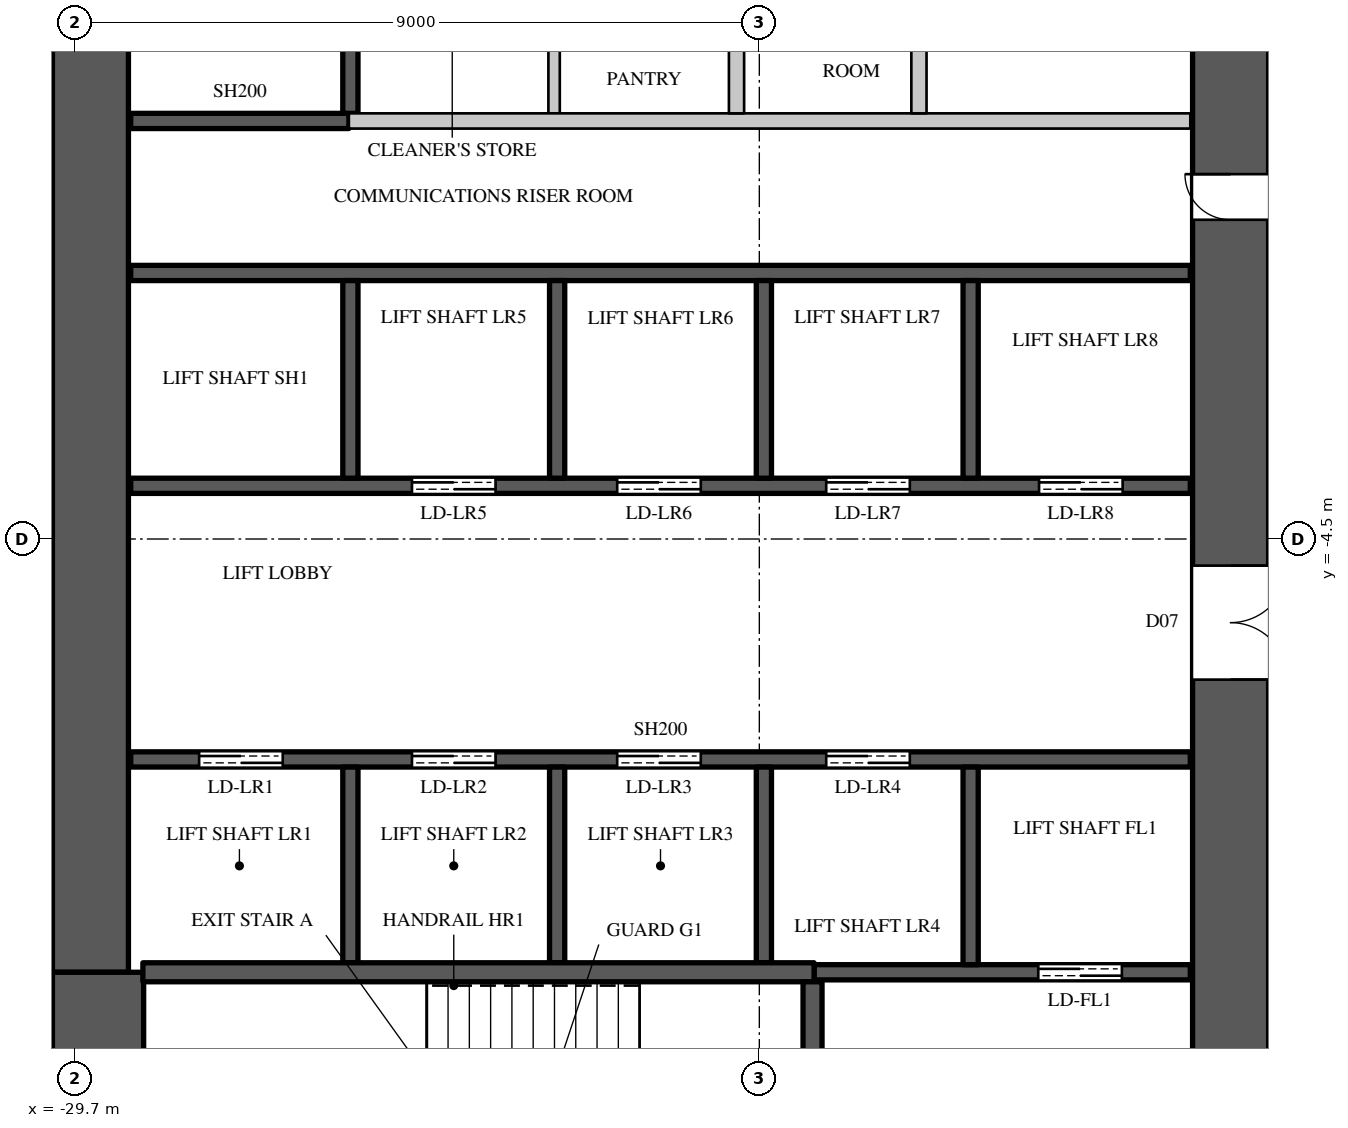
"""IFC4 building model, lengths in metres.
Left out: names, types, materials, properties, quantities, classifications, styles, units other than length and angle.
Written with IfcOpenShell. Run it as: python <this file> out.ifc"""

import sys

from ifc_helpers import new_model, si_unit, direction, frame, frame_2d, origin, place, context, subcontext, project, spatial, rectangle, extrude, element, fill, save


model = new_model("IFC4")
c1 = context("Model", 3, precision=1e-05, world=origin(), true_north=direction((0.0, 1.0)))
c2 = subcontext(c1, "Body", "Model", "MODEL_VIEW")
j1 = project(units=[si_unit("LENGTHUNIT", "METRE"), si_unit("PLANEANGLEUNIT", "RADIAN")], contexts=[c1])
p1 = place(None, origin())
s1 = spatial("IfcSite", under=j1, at=p1, CompositionType="ELEMENT")
p2 = place(p1, origin())
s2 = spatial("IfcBuilding", under=s1, at=p2, CompositionType="ELEMENT")
p3 = place(p2, frame((0.0, 0.0, 84.3)))
s3 = spatial("IfcBuildingStorey", under=s2, at=p3, CompositionType="ELEMENT", Elevation=84.3)
p4 = place(p3, frame((-14.5, -14.8, 0.0), z_axis=(0.0, 0.0, 1.0), x_axis=(0.0, 1.0, 0.0)))
e1 = element("IfcWall", 1, at=p4, inside=s3, PredefinedType="SHEAR", context=c2, shape_type="SweptSolid", body=[
    extrude(rectangle(XDim=29.6, YDim=1.0, at=frame_2d((14.8, 0.0))), origin(), (0.0, 0.0, 1.0), 3.6),
])
p5 = place(p4, frame((8.45, 0.0, 0.0)))
e2 = element("IfcOpeningElement", 2, at=p5, cuts=e1, PredefinedType="OPENING", context=c2, shape_type="SweptSolid", body=[
    extrude(rectangle(XDim=1.5, YDim=2.4, at=frame_2d((0.75, 1.2))), frame((0.0, 0.51, 0.0), z_axis=(0.0, -1.0, 0.0), x_axis=(1.0, 0.0, 0.0)), (0.0, 0.0, 1.0), 1.02),
])
p6 = place(p4, frame((19.65, 0.0, 0.0)))
e3 = element("IfcOpeningElement", 3, at=p6, cuts=e1, PredefinedType="OPENING", context=c2, shape_type="SweptSolid", body=[
    extrude(rectangle(XDim=1.5, YDim=2.4, at=frame_2d((0.75, 1.2))), frame((0.0, 0.51, 0.0), z_axis=(0.0, -1.0, 0.0), x_axis=(1.0, 0.0, 0.0)), (0.0, 0.0, 1.0), 1.02),
])
p7 = place(p4, frame((14.5, 0.0, 0.0)))
e4 = element("IfcOpeningElement", 4, at=p7, cuts=e1, PredefinedType="OPENING", context=c2, shape_type="SweptSolid", body=[
    extrude(rectangle(XDim=0.6, YDim=2.0, at=frame_2d((0.3, 1.0))), frame((0.0, 0.51, 0.0), z_axis=(0.0, -1.0, 0.0), x_axis=(1.0, 0.0, 0.0)), (0.0, 0.0, 1.0), 1.02),
])
p8 = place(p3, frame((-29.5, -10.2, 0.0), z_axis=(0.0, 0.0, 1.0), x_axis=(0.0, 1.0, 0.0)))
e5 = element("IfcWall", 5, at=p8, inside=s3, PredefinedType="SHEAR", context=c2, shape_type="SweptSolid", body=[
    extrude(rectangle(XDim=20.4, YDim=1.0, at=frame_2d((10.2, 0.0))), origin(), (0.0, 0.0, 1.0), 3.6),
])
p9 = place(p3, frame((-29.4, -14.8, 0.0), z_axis=(0.0, 0.0, 1.0), x_axis=(0.0, 1.0, 0.0)))
e6 = element("IfcWall", 6, at=p9, inside=s3, PredefinedType="SHEAR", context=c2, shape_type="SweptSolid", body=[
    extrude(rectangle(XDim=4.6, YDim=1.2, at=frame_2d((2.3, 0.0))), origin(), (0.0, 0.0, 1.0), 3.6),
])
p10 = place(p3, frame((-23.4, 1.1, 0.0), z_axis=(0.0, 0.0, 1.0), x_axis=(0.0, 1.0, 0.0)))
e7 = element("IfcWall", 7, at=p10, inside=s3, PredefinedType="PARTITIONING", context=c2, shape_type="SweptSolid", body=[
    extrude(rectangle(XDim=2.6, YDim=0.15, at=frame_2d((1.3, 0.0))), origin(), (0.0, 0.0, 1.0), 3.3),
])
p11 = place(p3, frame((-26.1, 1.0, 0.0), z_axis=(0.0, 0.0, 1.0), x_axis=(1.0, 0.0, 0.0)))
e8 = element("IfcWall", 8, at=p11, inside=s3, PredefinedType="PARTITIONING", context=c2, shape_type="SweptSolid", body=[
    extrude(rectangle(XDim=11.07, YDim=0.2, at=frame_2d((5.535, 0.0))), origin(), (0.0, 0.0, 1.0), 3.3),
])
for number, where, z_axis, x_axis in (
    (9, (-21.0, 1.1, 0.0), (0.0, 0.0, 1.0), (0.0, 1.0, 0.0)),
    (10, (-18.6, 1.1, 0.0), (0.0, 0.0, 1.0), (0.0, 1.0, 0.0)),
):
    element("IfcWall", number, at=place(p3, frame(where, z_axis=z_axis, x_axis=x_axis)), inside=s3, PredefinedType="PARTITIONING", context=c2, shape_type="SweptSolid", body=[
        extrude(rectangle(XDim=2.6, YDim=0.2, at=frame_2d((1.3, 0.0))), origin(), (0.0, 0.0, 1.0), 3.3),
    ])
p12 = place(p3, frame((-28.97, -7.4, 0.0), z_axis=(0.0, 0.0, 1.0), x_axis=(1.0, 0.0, 0.0)))
e11 = element("IfcWall", 11, at=p12, inside=s3, PredefinedType="SHEAR", context=c2, shape_type="SweptSolid", body=[
    extrude(rectangle(XDim=13.94, YDim=0.2, at=frame_2d((6.97, 0.0))), origin(), (0.0, 0.0, 1.0), 3.3),
])
p13 = place(p12, frame((0.9, 0.0, 0.0)))
e12 = element("IfcOpeningElement", 12, at=p13, cuts=e11, PredefinedType="OPENING", context=c2, shape_type="SweptSolid", body=[
    extrude(rectangle(XDim=1.1, YDim=2.2, at=frame_2d((0.55, 1.1))), frame((0.0, 0.11, 0.0), z_axis=(0.0, -1.0, 0.0), x_axis=(1.0, 0.0, 0.0)), (0.0, 0.0, 1.0), 0.22),
])
p14 = place(p12, frame((3.7, 0.0, 0.0)))
e13 = element("IfcOpeningElement", 13, at=p14, cuts=e11, PredefinedType="OPENING", context=c2, shape_type="SweptSolid", body=[
    extrude(rectangle(XDim=1.1, YDim=2.2, at=frame_2d((0.55, 1.1))), frame((0.0, 0.11, 0.0), z_axis=(0.0, -1.0, 0.0), x_axis=(1.0, 0.0, 0.0)), (0.0, 0.0, 1.0), 0.22),
])
p15 = place(p12, frame((6.4, 0.0, 0.0)))
e14 = element("IfcOpeningElement", 14, at=p15, cuts=e11, PredefinedType="OPENING", context=c2, shape_type="SweptSolid", body=[
    extrude(rectangle(XDim=1.1, YDim=2.2, at=frame_2d((0.55, 1.1))), frame((0.0, 0.11, 0.0), z_axis=(0.0, -1.0, 0.0), x_axis=(1.0, 0.0, 0.0)), (0.0, 0.0, 1.0), 0.22),
])
p16 = place(p12, frame((9.15, 0.0, 0.0)))
e15 = element("IfcOpeningElement", 15, at=p16, cuts=e11, PredefinedType="OPENING", context=c2, shape_type="SweptSolid", body=[
    extrude(rectangle(XDim=1.1, YDim=2.2, at=frame_2d((0.55, 1.1))), frame((0.0, 0.11, 0.0), z_axis=(0.0, -1.0, 0.0), x_axis=(1.0, 0.0, 0.0)), (0.0, 0.0, 1.0), 0.22),
])
p17 = place(p3, frame((-28.97, -3.8, 0.0), z_axis=(0.0, 0.0, 1.0), x_axis=(1.0, 0.0, 0.0)))
e16 = element("IfcWall", 16, at=p17, inside=s3, PredefinedType="SHEAR", context=c2, shape_type="SweptSolid", body=[
    extrude(rectangle(XDim=13.94, YDim=0.2, at=frame_2d((6.97, 0.0))), origin(), (0.0, 0.0, 1.0), 3.3),
])
p18 = place(p17, frame((3.7, 0.0, 0.0)))
e17 = element("IfcOpeningElement", 17, at=p18, cuts=e16, PredefinedType="OPENING", context=c2, shape_type="SweptSolid", body=[
    extrude(rectangle(XDim=1.1, YDim=2.2, at=frame_2d((0.55, 1.1))), frame((0.0, 0.11, 0.0), z_axis=(0.0, -1.0, 0.0), x_axis=(1.0, 0.0, 0.0)), (0.0, 0.0, 1.0), 0.22),
])
p19 = place(p17, frame((6.4, 0.0, 0.0)))
e18 = element("IfcOpeningElement", 18, at=p19, cuts=e16, PredefinedType="OPENING", context=c2, shape_type="SweptSolid", body=[
    extrude(rectangle(XDim=1.1, YDim=2.2, at=frame_2d((0.55, 1.1))), frame((0.0, 0.11, 0.0), z_axis=(0.0, -1.0, 0.0), x_axis=(1.0, 0.0, 0.0)), (0.0, 0.0, 1.0), 0.22),
])
p20 = place(p17, frame((9.15, 0.0, 0.0)))
e19 = element("IfcOpeningElement", 19, at=p20, cuts=e16, PredefinedType="OPENING", context=c2, shape_type="SweptSolid", body=[
    extrude(rectangle(XDim=1.1, YDim=2.2, at=frame_2d((0.55, 1.1))), frame((0.0, 0.11, 0.0), z_axis=(0.0, -1.0, 0.0), x_axis=(1.0, 0.0, 0.0)), (0.0, 0.0, 1.0), 0.22),
])
p21 = place(p17, frame((11.95, 0.0, 0.0)))
e20 = element("IfcOpeningElement", 20, at=p21, cuts=e16, PredefinedType="OPENING", context=c2, shape_type="SweptSolid", body=[
    extrude(rectangle(XDim=1.1, YDim=2.2, at=frame_2d((0.55, 1.1))), frame((0.0, 0.11, 0.0), z_axis=(0.0, -1.0, 0.0), x_axis=(1.0, 0.0, 0.0)), (0.0, 0.0, 1.0), 0.22),
])
p22 = place(p3, frame((-28.97, -1.0, 0.0), z_axis=(0.0, 0.0, 1.0), x_axis=(1.0, 0.0, 0.0)))
e21 = element("IfcWall", 21, at=p22, inside=s3, PredefinedType="SHEAR", context=c2, shape_type="SweptSolid", body=[
    extrude(rectangle(XDim=13.94, YDim=0.2, at=frame_2d((6.97, 0.0))), origin(), (0.0, 0.0, 1.0), 3.3),
])
p23 = place(p3, frame((-28.97, 1.0, 0.0), z_axis=(0.0, 0.0, 1.0), x_axis=(1.0, 0.0, 0.0)))
e22 = element("IfcWall", 22, at=p23, inside=s3, PredefinedType="SHEAR", context=c2, shape_type="SweptSolid", body=[
    extrude(rectangle(XDim=2.87, YDim=0.2, at=frame_2d((1.435, 0.0))), origin(), (0.0, 0.0, 1.0), 3.3),
])
p24 = place(p3, frame((-26.08, -10.075, 0.0), z_axis=(0.0, 0.0, 1.0), x_axis=(0.0, 1.0, 0.0)))
e23 = element("IfcWall", 23, at=p24, inside=s3, PredefinedType="SHEAR", context=c2, shape_type="SweptSolid", body=[
    extrude(rectangle(XDim=2.575, YDim=0.2, at=frame_2d((1.288, 0.0))), origin(), (0.0, 0.0, 1.0), 3.6),
])
p25 = place(p3, frame((-26.08, -3.7, 0.0), z_axis=(0.0, 0.0, 1.0), x_axis=(0.0, 1.0, 0.0)))
e24 = element("IfcWall", 24, at=p25, inside=s3, PredefinedType="SHEAR", context=c2, shape_type="SweptSolid", body=[
    extrude(rectangle(XDim=2.6, YDim=0.2, at=frame_2d((1.3, 0.0))), origin(), (0.0, 0.0, 1.0), 3.6),
])
p26 = place(p3, frame((-26.08, 1.1, 0.0), z_axis=(0.0, 0.0, 1.0), x_axis=(0.0, 1.0, 0.0)))
e25 = element("IfcWall", 25, at=p26, inside=s3, PredefinedType="SHEAR", context=c2, shape_type="SweptSolid", body=[
    extrude(rectangle(XDim=2.6, YDim=0.2, at=frame_2d((1.3, 0.0))), origin(), (0.0, 0.0, 1.0), 3.3),
])
p27 = place(p3, frame((-23.36, -10.075, 0.0), z_axis=(0.0, 0.0, 1.0), x_axis=(0.0, 1.0, 0.0)))
e26 = element("IfcWall", 26, at=p27, inside=s3, PredefinedType="SHEAR", context=c2, shape_type="SweptSolid", body=[
    extrude(rectangle(XDim=2.575, YDim=0.2, at=frame_2d((1.288, 0.0))), origin(), (0.0, 0.0, 1.0), 3.6),
])
p28 = place(p3, frame((-23.36, -3.7, 0.0), z_axis=(0.0, 0.0, 1.0), x_axis=(0.0, 1.0, 0.0)))
e27 = element("IfcWall", 27, at=p28, inside=s3, PredefinedType="SHEAR", context=c2, shape_type="SweptSolid", body=[
    extrude(rectangle(XDim=2.6, YDim=0.2, at=frame_2d((1.3, 0.0))), origin(), (0.0, 0.0, 1.0), 3.6),
])
p29 = place(p3, frame((-20.64, -10.075, 0.0), z_axis=(0.0, 0.0, 1.0), x_axis=(0.0, 1.0, 0.0)))
e28 = element("IfcWall", 28, at=p29, inside=s3, PredefinedType="SHEAR", context=c2, shape_type="SweptSolid", body=[
    extrude(rectangle(XDim=2.575, YDim=0.2, at=frame_2d((1.288, 0.0))), origin(), (0.0, 0.0, 1.0), 3.6),
])
p30 = place(p3, frame((-20.64, -3.7, 0.0), z_axis=(0.0, 0.0, 1.0), x_axis=(0.0, 1.0, 0.0)))
e29 = element("IfcWall", 29, at=p30, inside=s3, PredefinedType="SHEAR", context=c2, shape_type="SweptSolid", body=[
    extrude(rectangle(XDim=2.6, YDim=0.2, at=frame_2d((1.3, 0.0))), origin(), (0.0, 0.0, 1.0), 3.6),
])
p31 = place(p3, frame((-19.98, -10.2, 0.0), z_axis=(0.0, 0.0, 1.0), x_axis=(1.0, 0.0, 0.0)))
e30 = element("IfcWall", 30, at=p31, inside=s3, PredefinedType="SHEAR", context=c2, shape_type="SweptSolid", body=[
    extrude(rectangle(XDim=4.95, YDim=0.2, at=frame_2d((2.475, 0.0))), origin(), (0.0, 0.0, 1.0), 3.3),
])
p32 = place(p31, frame((2.95, 0.0, 0.0)))
e31 = element("IfcOpeningElement", 31, at=p32, cuts=e30, PredefinedType="OPENING", context=c2, shape_type="SweptSolid", body=[
    extrude(rectangle(XDim=1.1, YDim=2.2, at=frame_2d((0.55, 1.1))), frame((0.0, 0.11, 0.0), z_axis=(0.0, -1.0, 0.0), x_axis=(1.0, 0.0, 0.0)), (0.0, 0.0, 1.0), 0.22),
])
p33 = place(p3, frame((-17.92, -10.1, 0.0), z_axis=(0.0, 0.0, 1.0), x_axis=(0.0, 1.0, 0.0)))
e32 = element("IfcWall", 32, at=p33, inside=s3, PredefinedType="SHEAR", context=c2, shape_type="SweptSolid", body=[
    extrude(rectangle(XDim=2.6, YDim=0.2, at=frame_2d((1.3, 0.0))), origin(), (0.0, 0.0, 1.0), 3.6),
])
p34 = place(p3, frame((-17.92, -3.7, 0.0), z_axis=(0.0, 0.0, 1.0), x_axis=(0.0, 1.0, 0.0)))
e33 = element("IfcWall", 33, at=p34, inside=s3, PredefinedType="SHEAR", context=c2, shape_type="SweptSolid", body=[
    extrude(rectangle(XDim=2.6, YDim=0.2, at=frame_2d((1.3, 0.0))), origin(), (0.0, 0.0, 1.0), 3.6),
])
p35 = place(p3, frame((-28.81, -10.2, 0.0), z_axis=(0.0, 0.0, 1.0), x_axis=(1.0, 0.0, 0.0)))
e34 = element("IfcWall", 34, at=p35, inside=s3, PredefinedType="SHEAR", context=c2, shape_type="SweptSolid", body=[
    extrude(rectangle(XDim=8.83, YDim=0.25, at=frame_2d((4.415, 0.0))), origin(), (0.0, 0.0, 1.0), 3.3),
])
p36 = place(p3, frame((-20.0, -14.77, 0.0), z_axis=(0.0, 0.0, 1.0), x_axis=(0.0, 1.0, 0.0)))
e35 = element("IfcWall", 35, at=p36, inside=s3, PredefinedType="SHEAR", context=c2, shape_type="SweptSolid", body=[
    extrude(rectangle(XDim=4.445, YDim=0.25, at=frame_2d((2.223, 0.0))), origin(), (0.0, 0.0, 1.0), 3.3),
])
p37 = place(p36, frame((1.7, 0.0, 0.0)))
e36 = element("IfcOpeningElement", 36, at=p37, cuts=e35, PredefinedType="OPENING", context=c2, shape_type="SweptSolid", body=[
    extrude(rectangle(XDim=1.1, YDim=2.2, at=frame_2d((0.55, 1.1))), frame((0.0, 0.135, 0.0), z_axis=(0.0, -1.0, 0.0), x_axis=(1.0, 0.0, 0.0)), (0.0, 0.0, 1.0), 0.27),
])
p38 = place(p13, origin())
e37 = element("IfcDoor", 37, at=p38, inside=s3, OperationType="DOUBLE_DOOR_SLIDING", PredefinedType="DOOR", context=c2, shape_type="SweptSolid", body=[
    extrude(rectangle(XDim=1.1, YDim=2.2, at=frame_2d((0.55, 1.1))), frame((0.0, 0.025, 0.0), z_axis=(0.0, -1.0, 0.0), x_axis=(1.0, 0.0, 0.0)), (0.0, 0.0, 1.0), 0.05),
])
fill(e12, e37)
p39 = place(p14, origin())
e38 = element("IfcDoor", 38, at=p39, inside=s3, OperationType="DOUBLE_DOOR_SLIDING", PredefinedType="DOOR", context=c2, shape_type="SweptSolid", body=[
    extrude(rectangle(XDim=1.1, YDim=2.2, at=frame_2d((0.55, 1.1))), frame((0.0, 0.025, 0.0), z_axis=(0.0, -1.0, 0.0), x_axis=(1.0, 0.0, 0.0)), (0.0, 0.0, 1.0), 0.05),
])
fill(e13, e38)
p40 = place(p15, origin())
e39 = element("IfcDoor", 39, at=p40, inside=s3, OperationType="DOUBLE_DOOR_SLIDING", PredefinedType="DOOR", context=c2, shape_type="SweptSolid", body=[
    extrude(rectangle(XDim=1.1, YDim=2.2, at=frame_2d((0.55, 1.1))), frame((0.0, 0.025, 0.0), z_axis=(0.0, -1.0, 0.0), x_axis=(1.0, 0.0, 0.0)), (0.0, 0.0, 1.0), 0.05),
])
fill(e14, e39)
p41 = place(p16, origin())
e40 = element("IfcDoor", 40, at=p41, inside=s3, OperationType="DOUBLE_DOOR_SLIDING", PredefinedType="DOOR", context=c2, shape_type="SweptSolid", body=[
    extrude(rectangle(XDim=1.1, YDim=2.2, at=frame_2d((0.55, 1.1))), frame((0.0, 0.025, 0.0), z_axis=(0.0, -1.0, 0.0), x_axis=(1.0, 0.0, 0.0)), (0.0, 0.0, 1.0), 0.05),
])
fill(e15, e40)
p42 = place(p32, origin())
e41 = element("IfcDoor", 41, at=p42, inside=s3, OperationType="DOUBLE_DOOR_SLIDING", PredefinedType="DOOR", context=c2, shape_type="SweptSolid", body=[
    extrude(rectangle(XDim=1.1, YDim=2.2, at=frame_2d((0.55, 1.1))), frame((0.0, 0.025, 0.0), z_axis=(0.0, -1.0, 0.0), x_axis=(1.0, 0.0, 0.0)), (0.0, 0.0, 1.0), 0.05),
])
fill(e31, e41)
p43 = place(p18, origin())
e42 = element("IfcDoor", 42, at=p43, inside=s3, OperationType="DOUBLE_DOOR_SLIDING", PredefinedType="DOOR", context=c2, shape_type="SweptSolid", body=[
    extrude(rectangle(XDim=1.1, YDim=2.2, at=frame_2d((0.55, 1.1))), frame((0.0, 0.025, 0.0), z_axis=(0.0, -1.0, 0.0), x_axis=(1.0, 0.0, 0.0)), (0.0, 0.0, 1.0), 0.05),
])
fill(e17, e42)
p44 = place(p19, origin())
e43 = element("IfcDoor", 43, at=p44, inside=s3, OperationType="DOUBLE_DOOR_SLIDING", PredefinedType="DOOR", context=c2, shape_type="SweptSolid", body=[
    extrude(rectangle(XDim=1.1, YDim=2.2, at=frame_2d((0.55, 1.1))), frame((0.0, 0.025, 0.0), z_axis=(0.0, -1.0, 0.0), x_axis=(1.0, 0.0, 0.0)), (0.0, 0.0, 1.0), 0.05),
])
fill(e18, e43)
p45 = place(p20, origin())
e44 = element("IfcDoor", 44, at=p45, inside=s3, OperationType="DOUBLE_DOOR_SLIDING", PredefinedType="DOOR", context=c2, shape_type="SweptSolid", body=[
    extrude(rectangle(XDim=1.1, YDim=2.2, at=frame_2d((0.55, 1.1))), frame((0.0, 0.025, 0.0), z_axis=(0.0, -1.0, 0.0), x_axis=(1.0, 0.0, 0.0)), (0.0, 0.0, 1.0), 0.05),
])
fill(e19, e44)
p46 = place(p21, origin())
e45 = element("IfcDoor", 45, at=p46, inside=s3, OperationType="DOUBLE_DOOR_SLIDING", PredefinedType="DOOR", context=c2, shape_type="SweptSolid", body=[
    extrude(rectangle(XDim=1.1, YDim=2.2, at=frame_2d((0.55, 1.1))), frame((0.0, 0.025, 0.0), z_axis=(0.0, -1.0, 0.0), x_axis=(1.0, 0.0, 0.0)), (0.0, 0.0, 1.0), 0.05),
])
fill(e20, e45)
p47 = place(p5, origin())
e46 = element("IfcDoor", 46, at=p47, inside=s3, OperationType="DOUBLE_DOOR_SINGLE_SWING", PredefinedType="DOOR", context=c2, shape_type="SweptSolid", body=[
    extrude(rectangle(XDim=1.5, YDim=2.4, at=frame_2d((0.75, 1.2))), frame((0.0, -0.445, 0.0), z_axis=(0.0, -1.0, 0.0), x_axis=(1.0, 0.0, 0.0)), (0.0, 0.0, 1.0), 0.05),
])
fill(e2, e46)
p48 = place(p7, origin())
e47 = element("IfcDoor", 47, at=p48, inside=s3, OperationType="SINGLE_SWING_RIGHT", PredefinedType="DOOR", context=c2, shape_type="SweptSolid", body=[
    extrude(rectangle(XDim=0.6, YDim=2.0, at=frame_2d((0.3, 1.0))), frame((0.0, 0.495, 0.0), z_axis=(0.0, -1.0, 0.0), x_axis=(1.0, 0.0, 0.0)), (0.0, 0.0, 1.0), 0.05),
])
fill(e4, e47)
save(model, sys.argv[1])
